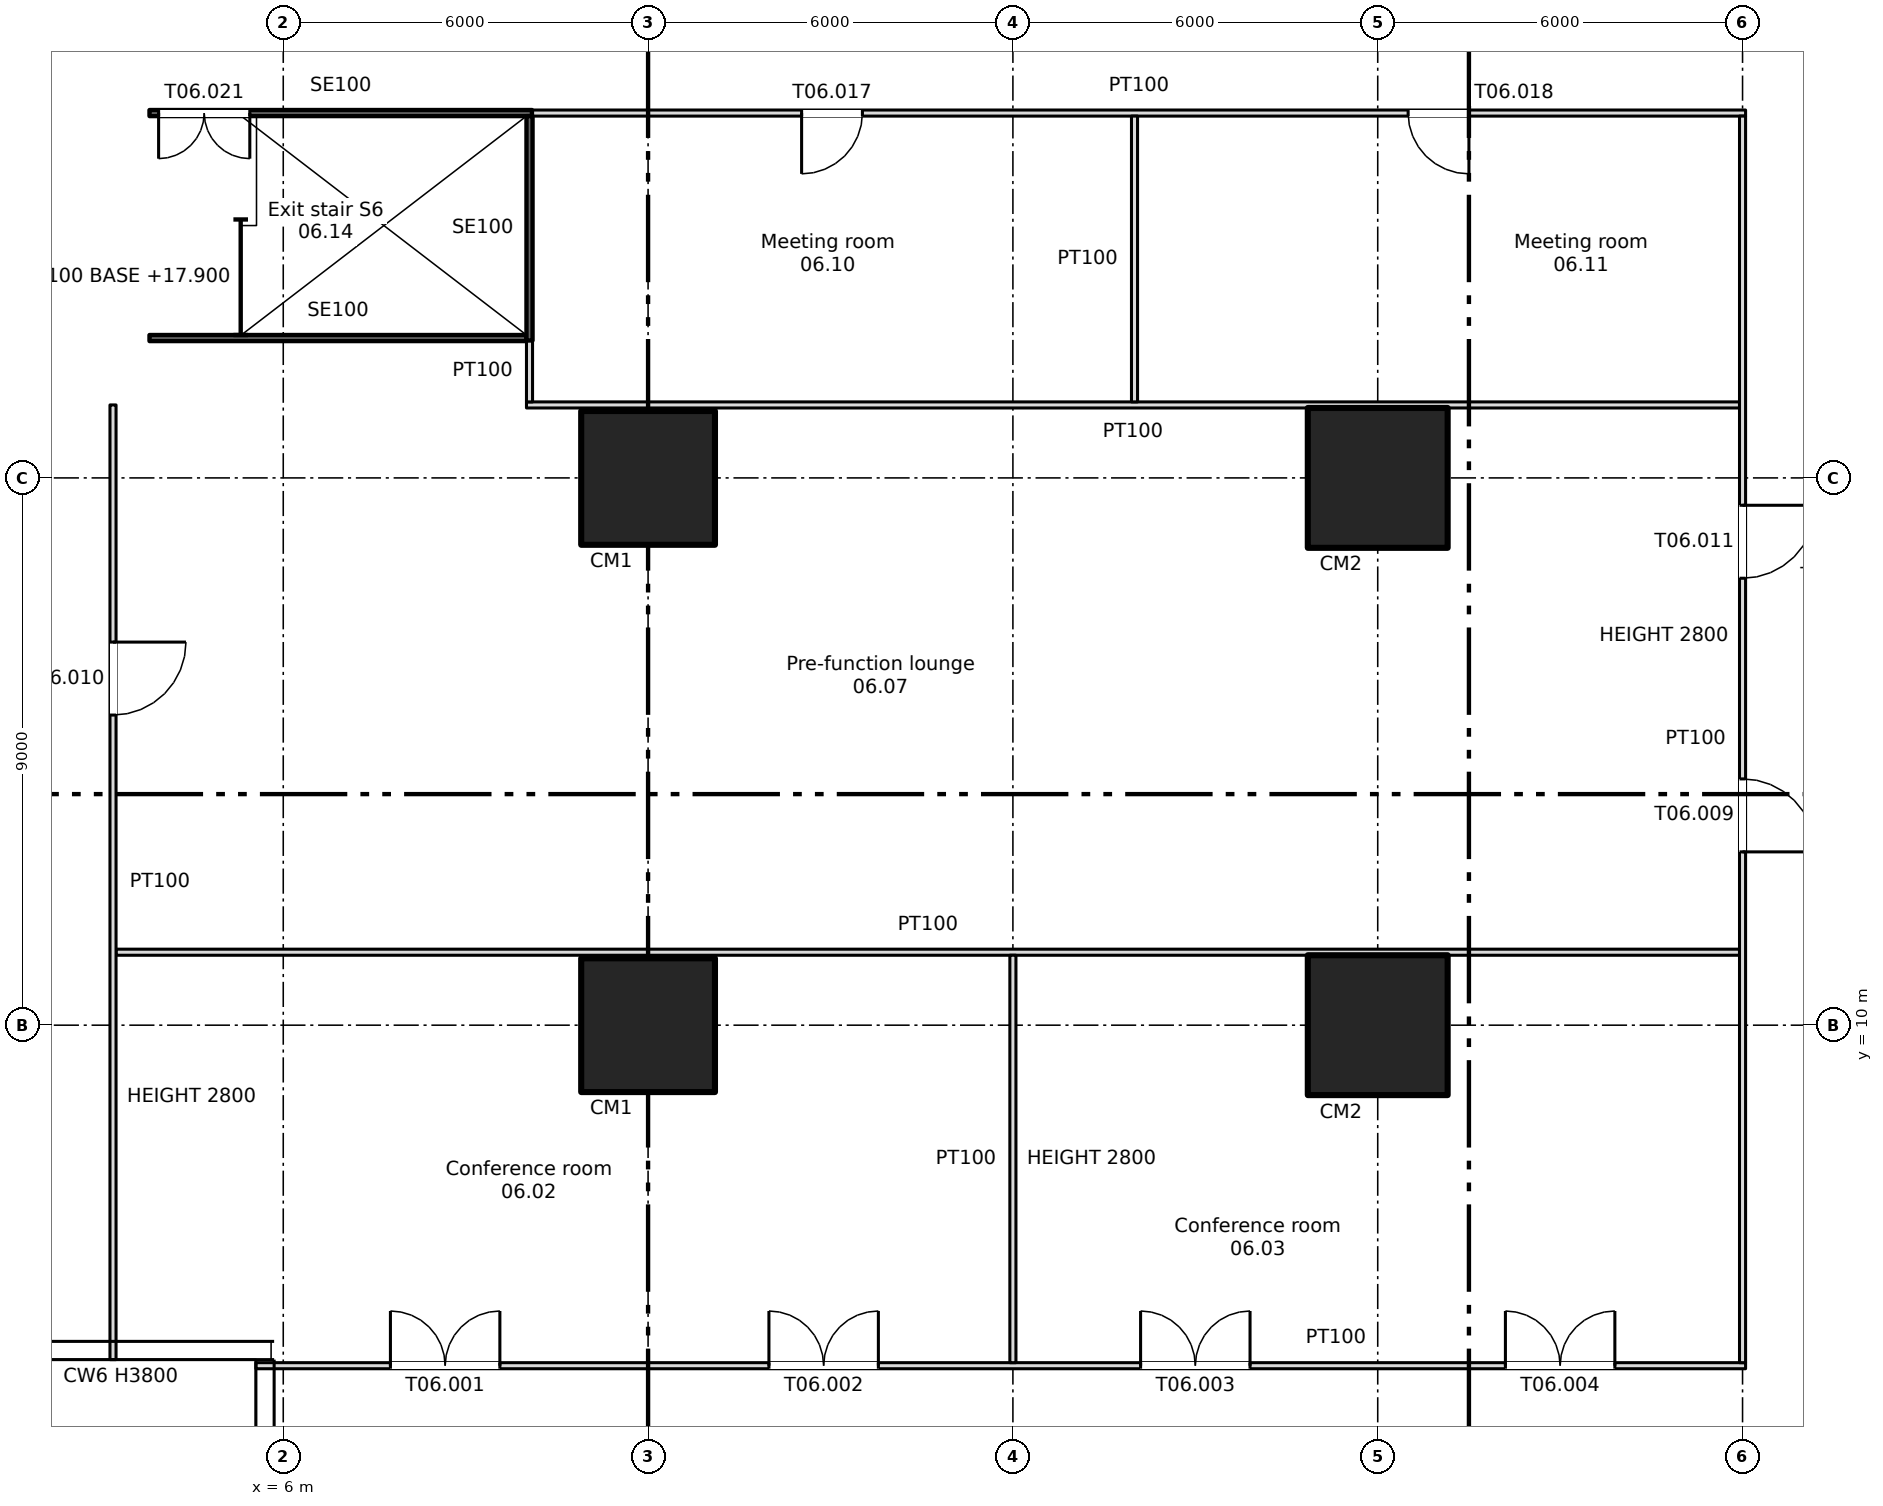
"""IFC4 building model, lengths in metres.
Left out: names, types, materials, properties, quantities, classifications, styles, units other than length and angle.
Written with IfcOpenShell. Run it as: python <this file> out.ifc"""

import sys

from ifc_helpers import new_model, si_unit, direction, frame, frame_2d, origin, origin_2d, place, context, subcontext, project, spatial, rectangle, extrude, element, fill, save


model = new_model("IFC4")
c1 = context("Model", 3, precision=1e-05, world=origin(), true_north=direction((0.0, 1.0)))
c2 = subcontext(c1, "Body", "Model", "MODEL_VIEW")
j1 = project(units=[si_unit("LENGTHUNIT", "METRE"), si_unit("PLANEANGLEUNIT", "RADIAN")], contexts=[c1])
p1 = place(None, origin())
s1 = spatial("IfcSite", under=j1, at=p1, CompositionType="ELEMENT")
p2 = place(p1, origin())
s2 = spatial("IfcBuilding", under=s1, at=p2, CompositionType="ELEMENT")
p3 = place(p2, frame((0.0, 0.0, 17.9)))
s3 = spatial("IfcBuildingStorey", under=s2, at=p3, CompositionType="ELEMENT", Elevation=17.9)
for number, where, z_axis, x_axis in (
    (1, (12.0, 10.0, 0.0), (0.0, 0.0, 1.0), (1.0, 0.0, 0.0)),
    (2, (12.0, 19.0, 0.0), (0.0, 0.0, 1.0), (1.0, 0.0, 0.0)),
):
    element("IfcColumn", number, at=place(p3, frame(where, z_axis=z_axis, x_axis=x_axis)), inside=s3, PredefinedType="COLUMN", context=c2, shape_type="SweptSolid", body=[
        extrude(rectangle(XDim=2.2, YDim=2.2, at=origin_2d()), origin(), (0.0, 0.0, 1.0), 3.8),
    ])
for number, where, z_axis, x_axis in (
    (3, (24.0, 10.0, 0.0), (0.0, 0.0, 1.0), (1.0, 0.0, 0.0)),
    (4, (24.0, 19.0, 0.0), (0.0, 0.0, 1.0), (1.0, 0.0, 0.0)),
):
    element("IfcColumn", number, at=place(p3, frame(where, z_axis=z_axis, x_axis=x_axis)), inside=s3, PredefinedType="COLUMN", context=c2, shape_type="SweptSolid", body=[
        extrude(rectangle(XDim=2.3, YDim=2.3, at=origin_2d()), origin(), (0.0, 0.0, 1.0), 3.8),
    ])
p4 = place(p3, frame((5.55, 4.4, 0.0), z_axis=(0.0, 0.0, 1.0), x_axis=(1.0, 0.0, 0.0)))
e5 = element("IfcWall", 5, at=p4, inside=s3, PredefinedType="PARTITIONING", context=c2, shape_type="SweptSolid", body=[
    extrude(rectangle(XDim=24.5, YDim=0.1, at=frame_2d((12.25, 0.0))), origin(), (0.0, 0.0, 1.0), 3.8),
])
p5 = place(p4, frame((2.212, 0.0, 0.0)))
e6 = element("IfcOpeningElement", 6, at=p5, cuts=e5, PredefinedType="OPENING", context=c2, shape_type="SweptSolid", body=[
    extrude(rectangle(XDim=1.8, YDim=2.1, at=frame_2d((0.9, 1.05))), frame((0.0, 0.06, 0.0), z_axis=(0.0, -1.0, 0.0), x_axis=(1.0, 0.0, 0.0)), (0.0, 0.0, 1.0), 0.12),
])
p6 = place(p4, frame((8.438, 0.0, 0.0)))
e7 = element("IfcOpeningElement", 7, at=p6, cuts=e5, PredefinedType="OPENING", context=c2, shape_type="SweptSolid", body=[
    extrude(rectangle(XDim=1.8, YDim=2.1, at=frame_2d((0.9, 1.05))), frame((0.0, 0.06, 0.0), z_axis=(0.0, -1.0, 0.0), x_axis=(1.0, 0.0, 0.0)), (0.0, 0.0, 1.0), 0.12),
])
p7 = place(p4, frame((14.55, 0.0, 0.0)))
e8 = element("IfcOpeningElement", 8, at=p7, cuts=e5, PredefinedType="OPENING", context=c2, shape_type="SweptSolid", body=[
    extrude(rectangle(XDim=1.8, YDim=2.1, at=frame_2d((0.9, 1.05))), frame((0.0, 0.06, 0.0), z_axis=(0.0, -1.0, 0.0), x_axis=(1.0, 0.0, 0.0)), (0.0, 0.0, 1.0), 0.12),
])
p8 = place(p4, frame((20.55, 0.0, 0.0)))
e9 = element("IfcOpeningElement", 9, at=p8, cuts=e5, PredefinedType="OPENING", context=c2, shape_type="SweptSolid", body=[
    extrude(rectangle(XDim=1.8, YDim=2.1, at=frame_2d((0.9, 1.05))), frame((0.0, 0.06, 0.0), z_axis=(0.0, -1.0, 0.0), x_axis=(1.0, 0.0, 0.0)), (0.0, 0.0, 1.0), 0.12),
])
p9 = place(p3, frame((3.25, 11.2, 0.0), z_axis=(0.0, 0.0, 1.0), x_axis=(1.0, 0.0, 0.0)))
e10 = element("IfcWall", 10, at=p9, inside=s3, PredefinedType="PARTITIONING", context=c2, shape_type="SweptSolid", body=[
    extrude(rectangle(XDim=26.7, YDim=0.1, at=frame_2d((13.35, 0.0))), origin(), (0.0, 0.0, 1.0), 3.8),
])
p10 = place(p3, frame((10.0, 20.2, 0.0), z_axis=(0.0, 0.0, 1.0), x_axis=(1.0, 0.0, 0.0)))
e11 = element("IfcWall", 11, at=p10, inside=s3, PredefinedType="PARTITIONING", context=c2, shape_type="SweptSolid", body=[
    extrude(rectangle(XDim=19.95, YDim=0.1, at=frame_2d((9.975, 0.0))), origin(), (0.0, 0.0, 1.0), 3.8),
])
p11 = place(p3, frame((3.8, 21.3, 0.0), z_axis=(0.0, 0.0, 1.0), x_axis=(1.0, 0.0, 0.0)))
e12 = element("IfcWall", 12, at=p11, inside=s3, PredefinedType="SOLIDWALL", context=c2, shape_type="SweptSolid", body=[
    extrude(rectangle(XDim=6.2, YDim=0.1, at=frame_2d((3.1, 0.0))), origin(), (0.0, 0.0, 1.0), 3.8),
])
p12 = place(p3, frame((3.8, 25.0, 0.0), z_axis=(0.0, 0.0, 1.0), x_axis=(1.0, 0.0, 0.0)))
e13 = element("IfcWall", 13, at=p12, inside=s3, PredefinedType="SOLIDWALL", context=c2, shape_type="SweptSolid", body=[
    extrude(rectangle(XDim=6.29, YDim=0.1, at=frame_2d((3.145, 0.0))), origin(), (0.0, 0.0, 1.0), 3.8),
])
p13 = place(p12, frame((0.15, 0.0, 0.0)))
e14 = element("IfcOpeningElement", 14, at=p13, cuts=e13, PredefinedType="OPENING", context=c2, shape_type="SweptSolid", body=[
    extrude(rectangle(XDim=1.5, YDim=2.1, at=frame_2d((0.75, 1.05))), frame((0.0, 0.06, 0.0), z_axis=(0.0, -1.0, 0.0), x_axis=(1.0, 0.0, 0.0)), (0.0, 0.0, 1.0), 0.12),
])
p14 = place(p3, frame((10.09, 25.0, 0.0), z_axis=(0.0, 0.0, 1.0), x_axis=(1.0, 0.0, 0.0)))
e15 = element("IfcWall", 15, at=p14, inside=s3, PredefinedType="PARTITIONING", context=c2, shape_type="SweptSolid", body=[
    extrude(rectangle(XDim=19.96, YDim=0.1, at=frame_2d((9.98, 0.0))), origin(), (0.0, 0.0, 1.0), 3.8),
])
p15 = place(p14, frame((4.435, 0.0, 0.0)))
e16 = element("IfcOpeningElement", 16, at=p15, cuts=e15, PredefinedType="OPENING", context=c2, shape_type="SweptSolid", body=[
    extrude(rectangle(XDim=1.0, YDim=2.1, at=frame_2d((0.5, 1.05))), frame((0.0, 0.06, 0.0), z_axis=(0.0, -1.0, 0.0), x_axis=(1.0, 0.0, 0.0)), (0.0, 0.0, 1.0), 0.12),
])
p16 = place(p14, frame((14.41, 0.0, 0.0)))
e17 = element("IfcOpeningElement", 17, at=p16, cuts=e15, PredefinedType="OPENING", context=c2, shape_type="SweptSolid", body=[
    extrude(rectangle(XDim=1.0, YDim=2.1, at=frame_2d((0.5, 1.05))), frame((0.0, 0.06, 0.0), z_axis=(0.0, -1.0, 0.0), x_axis=(1.0, 0.0, 0.0)), (0.0, 0.0, 1.0), 0.12),
])
p17 = place(p3, frame((3.2, 4.5, 0.0), z_axis=(0.0, 0.0, 1.0), x_axis=(0.0, 1.0, 0.0)))
e18 = element("IfcWall", 18, at=p17, inside=s3, PredefinedType="PARTITIONING", context=c2, shape_type="SweptSolid", body=[
    extrude(rectangle(XDim=15.7, YDim=0.1, at=frame_2d((7.85, 0.0))), origin(), (0.0, 0.0, 1.0), 2.8),
])
p18 = place(p17, frame((10.6, 0.0, 0.0)))
e19 = element("IfcOpeningElement", 19, at=p18, cuts=e18, PredefinedType="OPENING", context=c2, shape_type="SweptSolid", body=[
    extrude(rectangle(XDim=1.2, YDim=2.1, at=frame_2d((0.6, 1.05))), frame((0.0, 0.06, 0.0), z_axis=(0.0, -1.0, 0.0), x_axis=(1.0, 0.0, 0.0)), (0.0, 0.0, 1.0), 0.12),
])
p19 = place(p3, frame((10.05, 20.25, 0.0), z_axis=(0.0, 0.0, 1.0), x_axis=(0.0, 1.0, 0.0)))
e20 = element("IfcWall", 20, at=p19, inside=s3, PredefinedType="PARTITIONING", context=c2, shape_type="SweptSolid", body=[
    extrude(rectangle(XDim=1.01, YDim=0.1, at=frame_2d((0.505, 0.0))), origin(), (0.0, 0.0, 1.0), 3.8),
])
p20 = place(p3, frame((10.05, 21.26, 0.0), z_axis=(0.0, 0.0, 1.0), x_axis=(0.0, 1.0, 0.0)))
e21 = element("IfcWall", 21, at=p20, inside=s3, PredefinedType="SOLIDWALL", context=c2, shape_type="SweptSolid", body=[
    extrude(rectangle(XDim=3.69, YDim=0.1, at=frame_2d((1.845, 0.0))), origin(), (0.0, 0.0, 1.0), 3.8),
])
p21 = place(p3, frame((18.0, 4.45, 0.0), z_axis=(0.0, 0.0, 1.0), x_axis=(0.0, 1.0, 0.0)))
e22 = element("IfcWall", 22, at=p21, inside=s3, PredefinedType="PARTITIONING", context=c2, shape_type="SweptSolid", body=[
    extrude(rectangle(XDim=6.7, YDim=0.1, at=frame_2d((3.35, 0.0))), origin(), (0.0, 0.0, 1.0), 2.8),
])
p22 = place(p3, frame((20.0, 20.25, 0.0), z_axis=(0.0, 0.0, 1.0), x_axis=(0.0, 1.0, 0.0)))
e23 = element("IfcWall", 23, at=p22, inside=s3, PredefinedType="PARTITIONING", context=c2, shape_type="SweptSolid", body=[
    extrude(rectangle(XDim=4.7, YDim=0.1, at=frame_2d((2.35, 0.0))), origin(), (0.0, 0.0, 1.0), 3.8),
])
p23 = place(p3, frame((30.0, 4.45, 0.0), z_axis=(0.0, 0.0, 1.0), x_axis=(0.0, 1.0, 0.0)))
e24 = element("IfcWall", 24, at=p23, inside=s3, PredefinedType="PARTITIONING", context=c2, shape_type="SweptSolid", body=[
    extrude(rectangle(XDim=20.5, YDim=0.1, at=frame_2d((10.25, 0.0))), origin(), (0.0, 0.0, 1.0), 2.8),
])
p24 = place(p23, frame((8.4, 0.0, 0.0)))
e25 = element("IfcOpeningElement", 25, at=p24, cuts=e24, PredefinedType="OPENING", context=c2, shape_type="SweptSolid", body=[
    extrude(rectangle(XDim=1.2, YDim=2.1, at=frame_2d((0.6, 1.05))), frame((0.0, 0.06, 0.0), z_axis=(0.0, -1.0, 0.0), x_axis=(1.0, 0.0, 0.0)), (0.0, 0.0, 1.0), 0.12),
])
p25 = place(p23, frame((12.9, 0.0, 0.0)))
e26 = element("IfcOpeningElement", 26, at=p25, cuts=e24, PredefinedType="OPENING", context=c2, shape_type="SweptSolid", body=[
    extrude(rectangle(XDim=1.2, YDim=2.1, at=frame_2d((0.6, 1.05))), frame((0.0, 0.06, 0.0), z_axis=(0.0, -1.0, 0.0), x_axis=(1.0, 0.0, 0.0)), (0.0, 0.0, 1.0), 0.12),
])
p26 = place(p5, origin())
e27 = element("IfcDoor", 27, at=p26, inside=s3, OperationType="DOUBLE_DOOR_SINGLE_SWING", PredefinedType="DOOR", context=c2, shape_type="SweptSolid", body=[
    extrude(rectangle(XDim=1.8, YDim=2.1, at=frame_2d((0.9, 1.05))), frame((0.0, 0.025, 0.0), z_axis=(0.0, -1.0, 0.0), x_axis=(1.0, 0.0, 0.0)), (0.0, 0.0, 1.0), 0.05),
])
fill(e6, e27)
p27 = place(p6, origin())
e28 = element("IfcDoor", 28, at=p27, inside=s3, OperationType="DOUBLE_DOOR_SINGLE_SWING", PredefinedType="DOOR", context=c2, shape_type="SweptSolid", body=[
    extrude(rectangle(XDim=1.8, YDim=2.1, at=frame_2d((0.9, 1.05))), frame((0.0, 0.025, 0.0), z_axis=(0.0, -1.0, 0.0), x_axis=(1.0, 0.0, 0.0)), (0.0, 0.0, 1.0), 0.05),
])
fill(e7, e28)
p28 = place(p7, origin())
e29 = element("IfcDoor", 29, at=p28, inside=s3, OperationType="DOUBLE_DOOR_SINGLE_SWING", PredefinedType="DOOR", context=c2, shape_type="SweptSolid", body=[
    extrude(rectangle(XDim=1.8, YDim=2.1, at=frame_2d((0.9, 1.05))), frame((0.0, 0.025, 0.0), z_axis=(0.0, -1.0, 0.0), x_axis=(1.0, 0.0, 0.0)), (0.0, 0.0, 1.0), 0.05),
])
fill(e8, e29)
p29 = place(p8, origin())
e30 = element("IfcDoor", 30, at=p29, inside=s3, OperationType="DOUBLE_DOOR_SINGLE_SWING", PredefinedType="DOOR", context=c2, shape_type="SweptSolid", body=[
    extrude(rectangle(XDim=1.8, YDim=2.1, at=frame_2d((0.9, 1.05))), frame((0.0, 0.025, 0.0), z_axis=(0.0, -1.0, 0.0), x_axis=(1.0, 0.0, 0.0)), (0.0, 0.0, 1.0), 0.05),
])
fill(e9, e30)
p30 = place(p24, origin())
e31 = element("IfcDoor", 31, at=p30, inside=s3, OperationType="SINGLE_SWING_LEFT", PredefinedType="DOOR", context=c2, shape_type="SweptSolid", body=[
    extrude(rectangle(XDim=1.2, YDim=2.1, at=frame_2d((0.6, 1.05))), frame((0.0, 0.025, 0.0), z_axis=(0.0, -1.0, 0.0), x_axis=(1.0, 0.0, 0.0)), (0.0, 0.0, 1.0), 0.05),
])
fill(e25, e31)
p31 = place(p18, origin())
e32 = element("IfcDoor", 32, at=p31, inside=s3, OperationType="SINGLE_SWING_RIGHT", PredefinedType="DOOR", context=c2, shape_type="SweptSolid", body=[
    extrude(rectangle(XDim=1.2, YDim=2.1, at=frame_2d((0.6, 1.05))), frame((0.0, 0.025, 0.0), z_axis=(0.0, -1.0, 0.0), x_axis=(1.0, 0.0, 0.0)), (0.0, 0.0, 1.0), 0.05),
])
fill(e19, e32)
p32 = place(p25, origin())
e33 = element("IfcDoor", 33, at=p32, inside=s3, OperationType="SINGLE_SWING_RIGHT", PredefinedType="DOOR", context=c2, shape_type="SweptSolid", body=[
    extrude(rectangle(XDim=1.2, YDim=2.1, at=frame_2d((0.6, 1.05))), frame((0.0, 0.025, 0.0), z_axis=(0.0, -1.0, 0.0), x_axis=(1.0, 0.0, 0.0)), (0.0, 0.0, 1.0), 0.05),
])
fill(e26, e33)
p33 = place(p15, origin())
e34 = element("IfcDoor", 34, at=p33, inside=s3, OperationType="SINGLE_SWING_LEFT", PredefinedType="DOOR", context=c2, shape_type="SweptSolid", body=[
    extrude(rectangle(XDim=1.0, YDim=2.1, at=frame_2d((0.5, 1.05))), frame((0.0, 0.025, 0.0), z_axis=(0.0, -1.0, 0.0), x_axis=(1.0, 0.0, 0.0)), (0.0, 0.0, 1.0), 0.05),
])
fill(e16, e34)
p34 = place(p16, origin())
e35 = element("IfcDoor", 35, at=p34, inside=s3, OperationType="SINGLE_SWING_RIGHT", PredefinedType="DOOR", context=c2, shape_type="SweptSolid", body=[
    extrude(rectangle(XDim=1.0, YDim=2.1, at=frame_2d((0.5, 1.05))), frame((0.0, 0.025, 0.0), z_axis=(0.0, -1.0, 0.0), x_axis=(1.0, 0.0, 0.0)), (0.0, 0.0, 1.0), 0.05),
])
fill(e17, e35)
p35 = place(p13, origin())
e36 = element("IfcDoor", 36, at=p35, inside=s3, OperationType="DOUBLE_DOOR_SINGLE_SWING", PredefinedType="DOOR", context=c2, shape_type="SweptSolid", body=[
    extrude(rectangle(XDim=1.5, YDim=2.1, at=frame_2d((0.75, 1.05))), frame((0.0, 0.025, 0.0), z_axis=(0.0, -1.0, 0.0), x_axis=(1.0, 0.0, 0.0)), (0.0, 0.0, 1.0), 0.05),
])
fill(e14, e36)
save(model, sys.argv[1])
